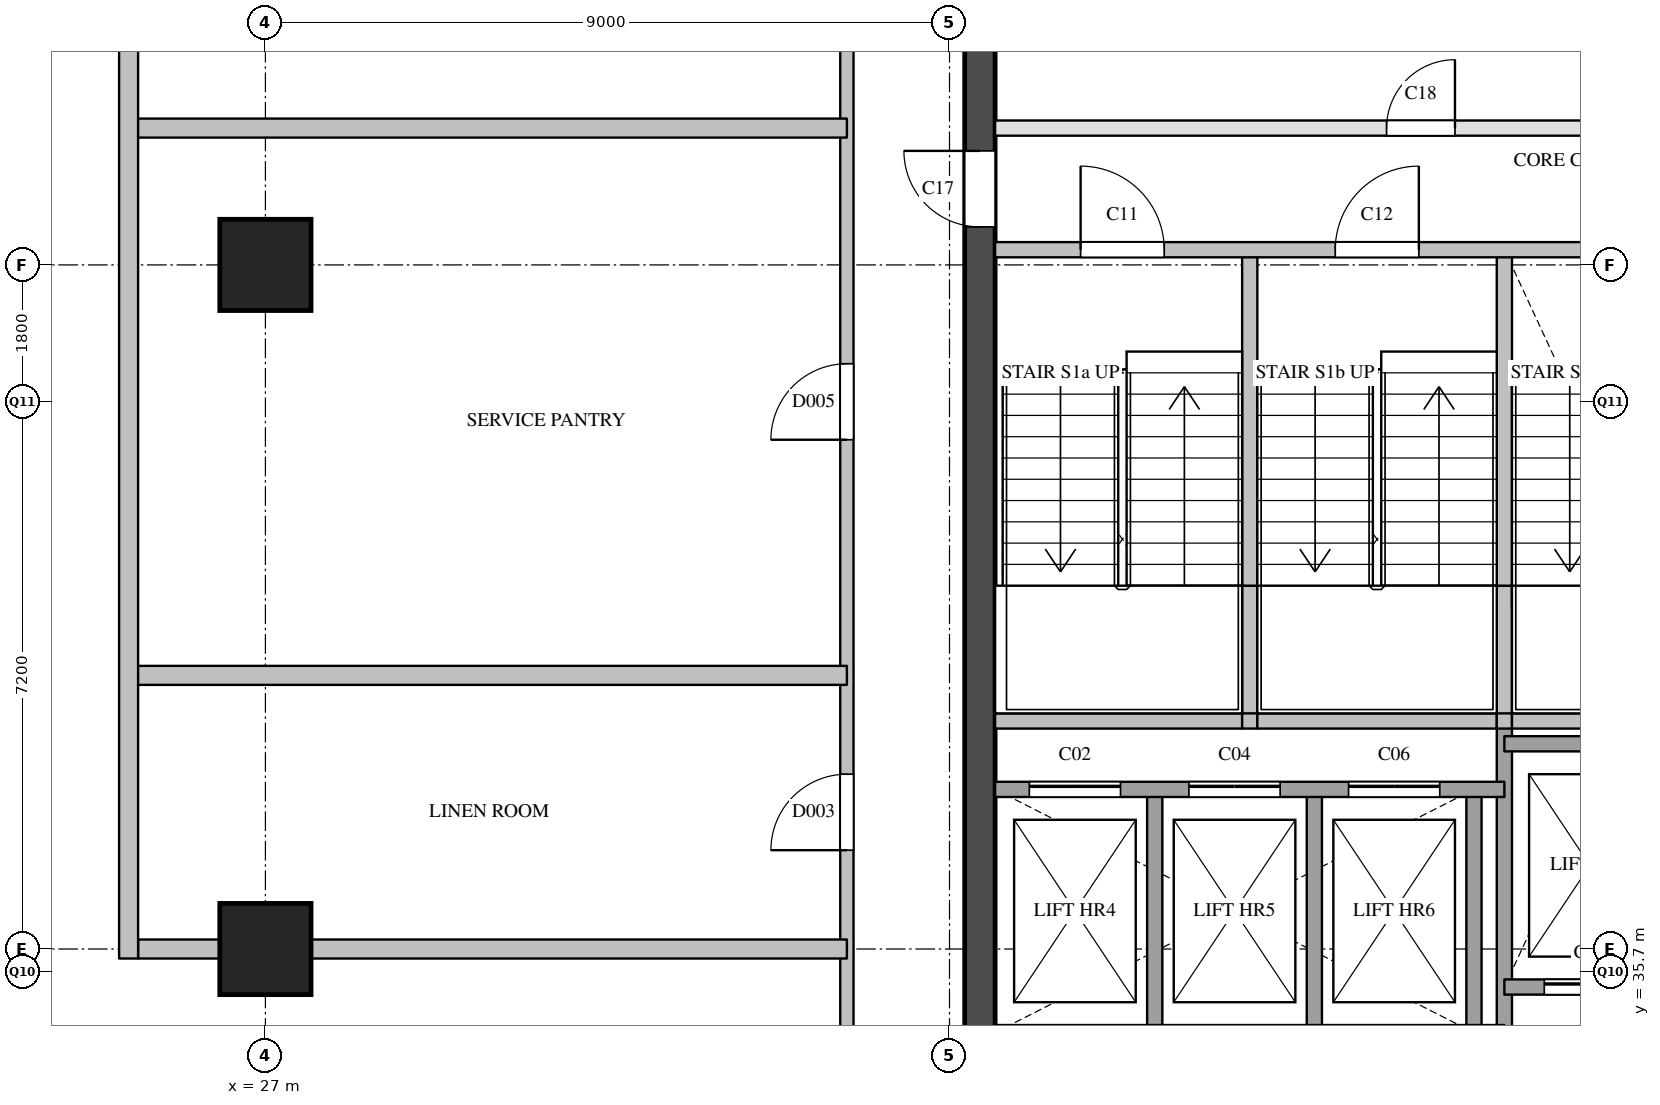
"""IFC4 building model, lengths in metres.
Left out: names, types, materials, properties, quantities, classifications, styles, units other than length and angle.
Written with IfcOpenShell. Run it as: python <this file> out.ifc"""

import sys

from ifc_helpers import new_model, si_unit, direction, frame, frame_2d, origin, origin_2d, place, context, subcontext, project, spatial, rectangle, extrude, element, fill, save


model = new_model("IFC4")
c1 = context("Model", 3, precision=1e-05, world=origin(), true_north=direction((0.0, 1.0)))
c2 = subcontext(c1, "Body", "Model", "MODEL_VIEW")
j1 = project(units=[si_unit("LENGTHUNIT", "METRE"), si_unit("PLANEANGLEUNIT", "RADIAN")], contexts=[c1])
p1 = place(None, origin())
s1 = spatial("IfcSite", under=j1, at=p1, CompositionType="ELEMENT")
p2 = place(p1, origin())
s2 = spatial("IfcBuilding", under=s1, at=p2, CompositionType="ELEMENT")
p3 = place(p2, frame((0.0, 0.0, 281.3)))
s3 = spatial("IfcBuildingStorey", under=s2, at=p3, CompositionType="ELEMENT", Elevation=281.3)
for number, where, z_axis, x_axis in (
    (1, (27.0, 36.0, 0.0), (0.0, 0.0, 1.0), (1.0, 0.0, 0.0)),
    (2, (27.0, 45.0, 0.0), (0.0, 0.0, 1.0), (1.0, 0.0, 0.0)),
):
    element("IfcColumn", number, at=place(p3, frame(where, z_axis=z_axis, x_axis=x_axis)), inside=s3, PredefinedType="COLUMN", context=c2, shape_type="SweptSolid", body=[
        extrude(rectangle(XDim=1.2, YDim=1.2, at=origin_2d()), origin(), (0.0, 0.0, 1.0), 3.9),
    ])
p4 = place(p3, frame((36.4, 29.1, 0.0), z_axis=(0.0, 0.0, 1.0), x_axis=(0.0, 1.0, 0.0)))
e3 = element("IfcWall", 3, at=p4, inside=s3, PredefinedType="SHEAR", context=c2, shape_type="SweptSolid", body=[
    extrude(rectangle(XDim=20.3, YDim=0.4, at=frame_2d((10.15, 0.0))), origin(), (0.0, 0.0, 1.0), 3.6),
])
p5 = place(p4, frame((3.6, 0.0, 0.0)))
e4 = element("IfcOpeningElement", 4, at=p5, cuts=e3, PredefinedType="OPENING", context=c2, shape_type="SweptSolid", body=[
    extrude(rectangle(XDim=1.8, YDim=2.1, at=frame_2d((0.9, 1.05))), frame((0.0, 0.21, 0.0), z_axis=(0.0, -1.0, 0.0), x_axis=(1.0, 0.0, 0.0)), (0.0, 0.0, 1.0), 0.42),
])
p6 = place(p4, frame((16.4, 0.0, 0.0)))
e5 = element("IfcOpeningElement", 5, at=p6, cuts=e3, PredefinedType="OPENING", context=c2, shape_type="SweptSolid", body=[
    extrude(rectangle(XDim=1.0, YDim=2.1, at=frame_2d((0.5, 1.05))), frame((0.0, 0.21, 0.0), z_axis=(0.0, -1.0, 0.0), x_axis=(1.0, 0.0, 0.0)), (0.0, 0.0, 1.0), 0.42),
])
p7 = place(p3, frame((38.7, 34.9, 0.0), z_axis=(0.0, 0.0, 1.0), x_axis=(0.0, 1.0, 0.0)))
e6 = element("IfcWall", 6, at=p7, inside=s3, PredefinedType="SOLIDWALL", context=c2, shape_type="SweptSolid", body=[
    extrude(rectangle(XDim=3.2, YDim=0.2, at=frame_2d((1.6, 0.0))), origin(), (0.0, 0.0, 1.0), 3.6),
])
p8 = place(p3, frame((39.95, 39.0, 0.0), z_axis=(0.0, 0.0, 1.0), x_axis=(0.0, 1.0, 0.0)))
e7 = element("IfcWall", 7, at=p8, inside=s3, PredefinedType="SOLIDWALL", context=c2, shape_type="SweptSolid", body=[
    extrude(rectangle(XDim=1.78, YDim=0.2, at=frame_2d((0.89, 0.0))), origin(), (0.0, 0.0, 1.0), 3.6),
])
p9 = place(p3, frame((39.95, 40.78, 0.0), z_axis=(0.0, 0.0, 1.0), x_axis=(0.0, 1.0, 0.0)))
e8 = element("IfcWall", 8, at=p9, inside=s3, PredefinedType="SOLIDWALL", context=c2, shape_type="SweptSolid", body=[
    extrude(rectangle(XDim=4.42, YDim=0.2, at=frame_2d((2.21, 0.0))), origin(), (0.0, 0.0, 1.0), 3.6),
])
for number, where, z_axis, x_axis in (
    (9, (40.8, 34.9, 0.0), (0.0, 0.0, 1.0), (0.0, 1.0, 0.0)),
    (10, (42.9, 34.9, 0.0), (0.0, 0.0, 1.0), (0.0, 1.0, 0.0)),
):
    element("IfcWall", number, at=place(p3, frame(where, z_axis=z_axis, x_axis=x_axis)), inside=s3, PredefinedType="SOLIDWALL", context=c2, shape_type="SweptSolid", body=[
        extrude(rectangle(XDim=3.2, YDim=0.2, at=frame_2d((1.6, 0.0))), origin(), (0.0, 0.0, 1.0), 3.6),
    ])
p10 = place(p3, frame((43.3, 29.1, 0.0), z_axis=(0.0, 0.0, 1.0), x_axis=(0.0, 1.0, 0.0)))
e11 = element("IfcWall", 11, at=p10, inside=s3, PredefinedType="SOLIDWALL", context=c2, shape_type="SweptSolid", body=[
    extrude(rectangle(XDim=9.9, YDim=0.2, at=frame_2d((4.95, 0.0))), origin(), (0.0, 0.0, 1.0), 3.6),
])
p11 = place(p3, frame((43.3, 39.0, 0.0), z_axis=(0.0, 0.0, 1.0), x_axis=(0.0, 1.0, 0.0)))
e12 = element("IfcWall", 12, at=p11, inside=s3, PredefinedType="SOLIDWALL", context=c2, shape_type="SweptSolid", body=[
    extrude(rectangle(XDim=1.78, YDim=0.2, at=frame_2d((0.89, 0.0))), origin(), (0.0, 0.0, 1.0), 3.6),
])
p12 = place(p3, frame((43.3, 40.78, 0.0), z_axis=(0.0, 0.0, 1.0), x_axis=(0.0, 1.0, 0.0)))
e13 = element("IfcWall", 13, at=p12, inside=s3, PredefinedType="SOLIDWALL", context=c2, shape_type="SweptSolid", body=[
    extrude(rectangle(XDim=4.42, YDim=0.2, at=frame_2d((2.21, 0.0))), origin(), (0.0, 0.0, 1.0), 3.6),
])
p13 = place(p3, frame((43.3, 35.5, 0.0), z_axis=(0.0, 0.0, 1.0), x_axis=(1.0, 0.0, 0.0)))
e14 = element("IfcWall", 14, at=p13, inside=s3, PredefinedType="SOLIDWALL", context=c2, shape_type="SweptSolid", body=[
    extrude(rectangle(XDim=4.5, YDim=0.2, at=frame_2d((2.25, 0.0))), origin(), (0.0, 0.0, 1.0), 3.6),
])
p14 = place(p13, frame((0.525, 0.0, 0.0)))
e15 = element("IfcOpeningElement", 15, at=p14, cuts=e14, PredefinedType="OPENING", context=c2, shape_type="SweptSolid", body=[
    extrude(rectangle(XDim=1.2, YDim=2.1, at=frame_2d((0.6, 1.05))), frame((0.0, 0.11, 0.0), z_axis=(0.0, -1.0, 0.0), x_axis=(1.0, 0.0, 0.0)), (0.0, 0.0, 1.0), 0.22),
])
p15 = place(p13, frame((3.025, 0.0, 0.0)))
e16 = element("IfcOpeningElement", 16, at=p15, cuts=e14, PredefinedType="OPENING", context=c2, shape_type="SweptSolid", body=[
    extrude(rectangle(XDim=0.7, YDim=2.1, at=frame_2d((0.35, 1.05))), frame((0.0, 0.11, 0.0), z_axis=(0.0, -1.0, 0.0), x_axis=(1.0, 0.0, 0.0)), (0.0, 0.0, 1.0), 0.22),
])
p16 = place(p3, frame((36.6, 38.1, 0.0), z_axis=(0.0, 0.0, 1.0), x_axis=(1.0, 0.0, 0.0)))
e17 = element("IfcWall", 17, at=p16, inside=s3, PredefinedType="SOLIDWALL", context=c2, shape_type="SweptSolid", body=[
    extrude(rectangle(XDim=6.7, YDim=0.2, at=frame_2d((3.35, 0.0))), origin(), (0.0, 0.0, 1.0), 3.6),
])
p17 = place(p16, frame((0.45, 0.0, 0.0)))
e18 = element("IfcOpeningElement", 18, at=p17, cuts=e17, PredefinedType="OPENING", context=c2, shape_type="SweptSolid", body=[
    extrude(rectangle(XDim=1.2, YDim=2.1, at=frame_2d((0.6, 1.05))), frame((0.0, 0.11, 0.0), z_axis=(0.0, -1.0, 0.0), x_axis=(1.0, 0.0, 0.0)), (0.0, 0.0, 1.0), 0.22),
])
p18 = place(p16, frame((2.55, 0.0, 0.0)))
e19 = element("IfcOpeningElement", 19, at=p18, cuts=e17, PredefinedType="OPENING", context=c2, shape_type="SweptSolid", body=[
    extrude(rectangle(XDim=1.2, YDim=2.1, at=frame_2d((0.6, 1.05))), frame((0.0, 0.11, 0.0), z_axis=(0.0, -1.0, 0.0), x_axis=(1.0, 0.0, 0.0)), (0.0, 0.0, 1.0), 0.22),
])
p19 = place(p16, frame((4.65, 0.0, 0.0)))
e20 = element("IfcOpeningElement", 20, at=p19, cuts=e17, PredefinedType="OPENING", context=c2, shape_type="SweptSolid", body=[
    extrude(rectangle(XDim=1.2, YDim=2.1, at=frame_2d((0.6, 1.05))), frame((0.0, 0.11, 0.0), z_axis=(0.0, -1.0, 0.0), x_axis=(1.0, 0.0, 0.0)), (0.0, 0.0, 1.0), 0.22),
])
p20 = place(p3, frame((43.3, 38.7, 0.0), z_axis=(0.0, 0.0, 1.0), x_axis=(1.0, 0.0, 0.0)))
e21 = element("IfcWall", 21, at=p20, inside=s3, PredefinedType="SOLIDWALL", context=c2, shape_type="SweptSolid", body=[
    extrude(rectangle(XDim=4.5, YDim=0.2, at=frame_2d((2.25, 0.0))), origin(), (0.0, 0.0, 1.0), 3.6),
])
p21 = place(p3, frame((36.6, 39.0, 0.0), z_axis=(0.0, 0.0, 1.0), x_axis=(1.0, 0.0, 0.0)))
e22 = element("IfcWall", 22, at=p21, inside=s3, PredefinedType="SOLIDWALL", context=c2, shape_type="SweptSolid", body=[
    extrude(rectangle(XDim=3.25, YDim=0.2, at=frame_2d((1.625, 0.0))), origin(), (0.0, 0.0, 1.0), 3.6),
])
p22 = place(p3, frame((39.85, 39.0, 0.0), z_axis=(0.0, 0.0, 1.0), x_axis=(1.0, 0.0, 0.0)))
e23 = element("IfcWall", 23, at=p22, inside=s3, PredefinedType="SOLIDWALL", context=c2, shape_type="SweptSolid", body=[
    extrude(rectangle(XDim=0.2, YDim=0.2, at=frame_2d((0.1, 0.0))), origin(), (0.0, 0.0, 1.0), 3.6),
])
p23 = place(p3, frame((40.05, 39.0, 0.0), z_axis=(0.0, 0.0, 1.0), x_axis=(1.0, 0.0, 0.0)))
e24 = element("IfcWall", 24, at=p23, inside=s3, PredefinedType="SOLIDWALL", context=c2, shape_type="SweptSolid", body=[
    extrude(rectangle(XDim=3.15, YDim=0.2, at=frame_2d((1.575, 0.0))), origin(), (0.0, 0.0, 1.0), 3.6),
])
p24 = place(p3, frame((43.2, 39.0, 0.0), z_axis=(0.0, 0.0, 1.0), x_axis=(1.0, 0.0, 0.0)))
e25 = element("IfcWall", 25, at=p24, inside=s3, PredefinedType="SOLIDWALL", context=c2, shape_type="SweptSolid", body=[
    extrude(rectangle(XDim=0.2, YDim=0.2, at=frame_2d((0.1, 0.0))), origin(), (0.0, 0.0, 1.0), 3.6),
])
p25 = place(p3, frame((43.4, 39.0, 0.0), z_axis=(0.0, 0.0, 1.0), x_axis=(1.0, 0.0, 0.0)))
e26 = element("IfcWall", 26, at=p25, inside=s3, PredefinedType="SOLIDWALL", context=c2, shape_type="SweptSolid", body=[
    extrude(rectangle(XDim=3.25, YDim=0.2, at=frame_2d((1.625, 0.0))), origin(), (0.0, 0.0, 1.0), 3.6),
])
p26 = place(p3, frame((36.6, 45.2, 0.0), z_axis=(0.0, 0.0, 1.0), x_axis=(1.0, 0.0, 0.0)))
e27 = element("IfcWall", 27, at=p26, inside=s3, PredefinedType="SOLIDWALL", context=c2, shape_type="SweptSolid", body=[
    extrude(rectangle(XDim=10.05, YDim=0.2, at=frame_2d((5.025, 0.0))), origin(), (0.0, 0.0, 1.0), 3.6),
])
p27 = place(p26, frame((1.125, 0.0, 0.0)))
e28 = element("IfcOpeningElement", 28, at=p27, cuts=e27, PredefinedType="OPENING", context=c2, shape_type="SweptSolid", body=[
    extrude(rectangle(XDim=1.1, YDim=2.1, at=frame_2d((0.55, 1.05))), frame((0.0, 0.11, 0.0), z_axis=(0.0, -1.0, 0.0), x_axis=(1.0, 0.0, 0.0)), (0.0, 0.0, 1.0), 0.22),
])
p28 = place(p26, frame((4.475, 0.0, 0.0)))
e29 = element("IfcOpeningElement", 29, at=p28, cuts=e27, PredefinedType="OPENING", context=c2, shape_type="SweptSolid", body=[
    extrude(rectangle(XDim=1.1, YDim=2.1, at=frame_2d((0.55, 1.05))), frame((0.0, 0.11, 0.0), z_axis=(0.0, -1.0, 0.0), x_axis=(1.0, 0.0, 0.0)), (0.0, 0.0, 1.0), 0.22),
])
p29 = place(p26, frame((7.825, 0.0, 0.0)))
e30 = element("IfcOpeningElement", 30, at=p29, cuts=e27, PredefinedType="OPENING", context=c2, shape_type="SweptSolid", body=[
    extrude(rectangle(XDim=1.1, YDim=2.1, at=frame_2d((0.55, 1.05))), frame((0.0, 0.11, 0.0), z_axis=(0.0, -1.0, 0.0), x_axis=(1.0, 0.0, 0.0)), (0.0, 0.0, 1.0), 0.22),
])
p30 = place(p3, frame((36.6, 46.8, 0.0), z_axis=(0.0, 0.0, 1.0), x_axis=(1.0, 0.0, 0.0)))
e31 = element("IfcWall", 31, at=p30, inside=s3, PredefinedType="PARTITIONING", context=c2, shape_type="SweptSolid", body=[
    extrude(rectangle(XDim=11.2, YDim=0.2, at=frame_2d((5.6, 0.0))), origin(), (0.0, 0.0, 1.0), 3.6),
])
p31 = place(p30, frame((5.15, 0.0, 0.0)))
e32 = element("IfcOpeningElement", 32, at=p31, cuts=e31, PredefinedType="OPENING", context=c2, shape_type="SweptSolid", body=[
    extrude(rectangle(XDim=0.9, YDim=2.1, at=frame_2d((0.45, 1.05))), frame((0.0, 0.11, 0.0), z_axis=(0.0, -1.0, 0.0), x_axis=(1.0, 0.0, 0.0)), (0.0, 0.0, 1.0), 0.22),
])
p32 = place(p3, frame((34.65, 28.5, 0.0), z_axis=(0.0, 0.0, 1.0), x_axis=(0.0, 1.0, 0.0)))
e33 = element("IfcWall", 33, at=p32, inside=s3, PredefinedType="PARTITIONING", context=c2, shape_type="SweptSolid", body=[
    extrude(rectangle(XDim=22.85, YDim=0.175, at=frame_2d((11.425, 0.0))), origin(), (0.0, 0.0, 1.0), 3.6),
])
p33 = place(p32, frame((3.3, 0.0, 0.0)))
e34 = element("IfcOpeningElement", 34, at=p33, cuts=e33, PredefinedType="OPENING", context=c2, shape_type="SweptSolid", body=[
    extrude(rectangle(XDim=0.9, YDim=2.1, at=frame_2d((0.45, 1.05))), frame((0.0, 0.097, 0.0), z_axis=(0.0, -1.0, 0.0), x_axis=(1.0, 0.0, 0.0)), (0.0, 0.0, 1.0), 0.195),
])
p34 = place(p32, frame((8.8, 0.0, 0.0)))
e35 = element("IfcOpeningElement", 35, at=p34, cuts=e33, PredefinedType="OPENING", context=c2, shape_type="SweptSolid", body=[
    extrude(rectangle(XDim=1.0, YDim=2.1, at=frame_2d((0.5, 1.05))), frame((0.0, 0.097, 0.0), z_axis=(0.0, -1.0, 0.0), x_axis=(1.0, 0.0, 0.0)), (0.0, 0.0, 1.0), 0.195),
])
p35 = place(p32, frame((14.2, 0.0, 0.0)))
e36 = element("IfcOpeningElement", 36, at=p35, cuts=e33, PredefinedType="OPENING", context=c2, shape_type="SweptSolid", body=[
    extrude(rectangle(XDim=1.0, YDim=2.1, at=frame_2d((0.5, 1.05))), frame((0.0, 0.097, 0.0), z_axis=(0.0, -1.0, 0.0), x_axis=(1.0, 0.0, 0.0)), (0.0, 0.0, 1.0), 0.195),
])
p36 = place(p32, frame((19.65, 0.0, 0.0)))
e37 = element("IfcOpeningElement", 37, at=p36, cuts=e33, PredefinedType="OPENING", context=c2, shape_type="SweptSolid", body=[
    extrude(rectangle(XDim=0.9, YDim=2.1, at=frame_2d((0.45, 1.05))), frame((0.0, 0.097, 0.0), z_axis=(0.0, -1.0, 0.0), x_axis=(1.0, 0.0, 0.0)), (0.0, 0.0, 1.0), 0.195),
])
p37 = place(p3, frame((25.325, 36.0, 0.0), z_axis=(0.0, 0.0, 1.0), x_axis=(1.0, 0.0, 0.0)))
e38 = element("IfcWall", 38, at=p37, inside=s3, PredefinedType="PARTITIONING", context=c2, shape_type="SweptSolid", body=[
    extrude(rectangle(XDim=9.325, YDim=0.25, at=frame_2d((4.663, 0.0))), origin(), (0.0, 0.0, 1.0), 3.6),
])
for number, where, z_axis, x_axis in (
    (39, (25.2, 39.6, 0.0), (0.0, 0.0, 1.0), (1.0, 0.0, 0.0)),
    (40, (25.2, 46.8, 0.0), (0.0, 0.0, 1.0), (1.0, 0.0, 0.0)),
):
    element("IfcWall", number, at=place(p3, frame(where, z_axis=z_axis, x_axis=x_axis)), inside=s3, PredefinedType="PARTITIONING", context=c2, shape_type="SweptSolid", body=[
        extrude(rectangle(XDim=9.45, YDim=0.25, at=frame_2d((4.725, 0.0))), origin(), (0.0, 0.0, 1.0), 2.6),
    ])
p38 = place(p3, frame((25.2, 35.875, 0.0), z_axis=(0.0, 0.0, 1.0), x_axis=(0.0, 1.0, 0.0)))
e41 = element("IfcWall", 41, at=p38, inside=s3, PredefinedType="PARTITIONING", context=c2, shape_type="SweptSolid", body=[
    extrude(rectangle(XDim=18.125, YDim=0.25, at=frame_2d((9.062, 0.0))), origin(), (0.0, 0.0, 1.0), 2.6),
])
p39 = place(p38, frame((15.875, 0.0, 0.0)))
e42 = element("IfcOpeningElement", 42, at=p39, cuts=e41, PredefinedType="OPENING", context=c2, shape_type="SweptSolid", body=[
    extrude(rectangle(XDim=0.9, YDim=2.1, at=frame_2d((0.45, 1.05))), frame((0.0, 0.135, 0.0), z_axis=(0.0, -1.0, 0.0), x_axis=(1.0, 0.0, 0.0)), (0.0, 0.0, 1.0), 0.27),
])
p40 = place(p17, origin())
e43 = element("IfcDoor", 43, at=p40, inside=s3, OperationType="SLIDING_TO_LEFT", PredefinedType="DOOR", context=c2, shape_type="SweptSolid", body=[
    extrude(rectangle(XDim=1.2, YDim=2.1, at=frame_2d((0.6, 1.05))), frame((0.0, 0.025, 0.0), z_axis=(0.0, -1.0, 0.0), x_axis=(1.0, 0.0, 0.0)), (0.0, 0.0, 1.0), 0.05),
])
fill(e18, e43)
p41 = place(p18, origin())
e44 = element("IfcDoor", 44, at=p41, inside=s3, OperationType="SLIDING_TO_LEFT", PredefinedType="DOOR", context=c2, shape_type="SweptSolid", body=[
    extrude(rectangle(XDim=1.2, YDim=2.1, at=frame_2d((0.6, 1.05))), frame((0.0, 0.025, 0.0), z_axis=(0.0, -1.0, 0.0), x_axis=(1.0, 0.0, 0.0)), (0.0, 0.0, 1.0), 0.05),
])
fill(e19, e44)
p42 = place(p19, origin())
e45 = element("IfcDoor", 45, at=p42, inside=s3, OperationType="SLIDING_TO_LEFT", PredefinedType="DOOR", context=c2, shape_type="SweptSolid", body=[
    extrude(rectangle(XDim=1.2, YDim=2.1, at=frame_2d((0.6, 1.05))), frame((0.0, 0.025, 0.0), z_axis=(0.0, -1.0, 0.0), x_axis=(1.0, 0.0, 0.0)), (0.0, 0.0, 1.0), 0.05),
])
fill(e20, e45)
p43 = place(p14, origin())
e46 = element("IfcDoor", 46, at=p43, inside=s3, OperationType="SLIDING_TO_LEFT", PredefinedType="DOOR", context=c2, shape_type="SweptSolid", body=[
    extrude(rectangle(XDim=1.2, YDim=2.1, at=frame_2d((0.6, 1.05))), frame((0.0, 0.025, 0.0), z_axis=(0.0, -1.0, 0.0), x_axis=(1.0, 0.0, 0.0)), (0.0, 0.0, 1.0), 0.05),
])
fill(e15, e46)
p44 = place(p27, origin())
e47 = element("IfcDoor", 47, at=p44, inside=s3, OperationType="SINGLE_SWING_LEFT", PredefinedType="DOOR", context=c2, shape_type="SweptSolid", body=[
    extrude(rectangle(XDim=1.1, YDim=2.1, at=frame_2d((0.55, 1.05))), frame((0.0, 0.025, 0.0), z_axis=(0.0, -1.0, 0.0), x_axis=(1.0, 0.0, 0.0)), (0.0, 0.0, 1.0), 0.05),
])
fill(e28, e47)
p45 = place(p28, origin())
e48 = element("IfcDoor", 48, at=p45, inside=s3, OperationType="SINGLE_SWING_RIGHT", PredefinedType="DOOR", context=c2, shape_type="SweptSolid", body=[
    extrude(rectangle(XDim=1.1, YDim=2.1, at=frame_2d((0.55, 1.05))), frame((0.0, 0.025, 0.0), z_axis=(0.0, -1.0, 0.0), x_axis=(1.0, 0.0, 0.0)), (0.0, 0.0, 1.0), 0.05),
])
fill(e29, e48)
p46 = place(p6, origin())
e49 = element("IfcDoor", 49, at=p46, inside=s3, OperationType="SINGLE_SWING_RIGHT", PredefinedType="DOOR", context=c2, shape_type="SweptSolid", body=[
    extrude(rectangle(XDim=1.0, YDim=2.1, at=frame_2d((0.5, 1.05))), frame((0.0, 0.025, 0.0), z_axis=(0.0, -1.0, 0.0), x_axis=(1.0, 0.0, 0.0)), (0.0, 0.0, 1.0), 0.05),
])
fill(e5, e49)
p47 = place(p31, origin())
e50 = element("IfcDoor", 50, at=p47, inside=s3, OperationType="SINGLE_SWING_RIGHT", PredefinedType="DOOR", context=c2, shape_type="SweptSolid", body=[
    extrude(rectangle(XDim=0.9, YDim=2.1, at=frame_2d((0.45, 1.05))), frame((0.0, 0.025, 0.0), z_axis=(0.0, -1.0, 0.0), x_axis=(1.0, 0.0, 0.0)), (0.0, 0.0, 1.0), 0.05),
])
fill(e32, e50)
p48 = place(p34, origin())
e51 = element("IfcDoor", 51, at=p48, inside=s3, OperationType="SINGLE_SWING_LEFT", PredefinedType="DOOR", context=c2, shape_type="SweptSolid", body=[
    extrude(rectangle(XDim=1.0, YDim=2.1, at=frame_2d((0.5, 1.05))), frame((0.0, 0.025, 0.0), z_axis=(0.0, -1.0, 0.0), x_axis=(1.0, 0.0, 0.0)), (0.0, 0.0, 1.0), 0.05),
])
fill(e35, e51)
p49 = place(p35, origin())
e52 = element("IfcDoor", 52, at=p49, inside=s3, OperationType="SINGLE_SWING_LEFT", PredefinedType="DOOR", context=c2, shape_type="SweptSolid", body=[
    extrude(rectangle(XDim=1.0, YDim=2.1, at=frame_2d((0.5, 1.05))), frame((0.0, 0.025, 0.0), z_axis=(0.0, -1.0, 0.0), x_axis=(1.0, 0.0, 0.0)), (0.0, 0.0, 1.0), 0.05),
])
fill(e36, e52)
save(model, sys.argv[1])
